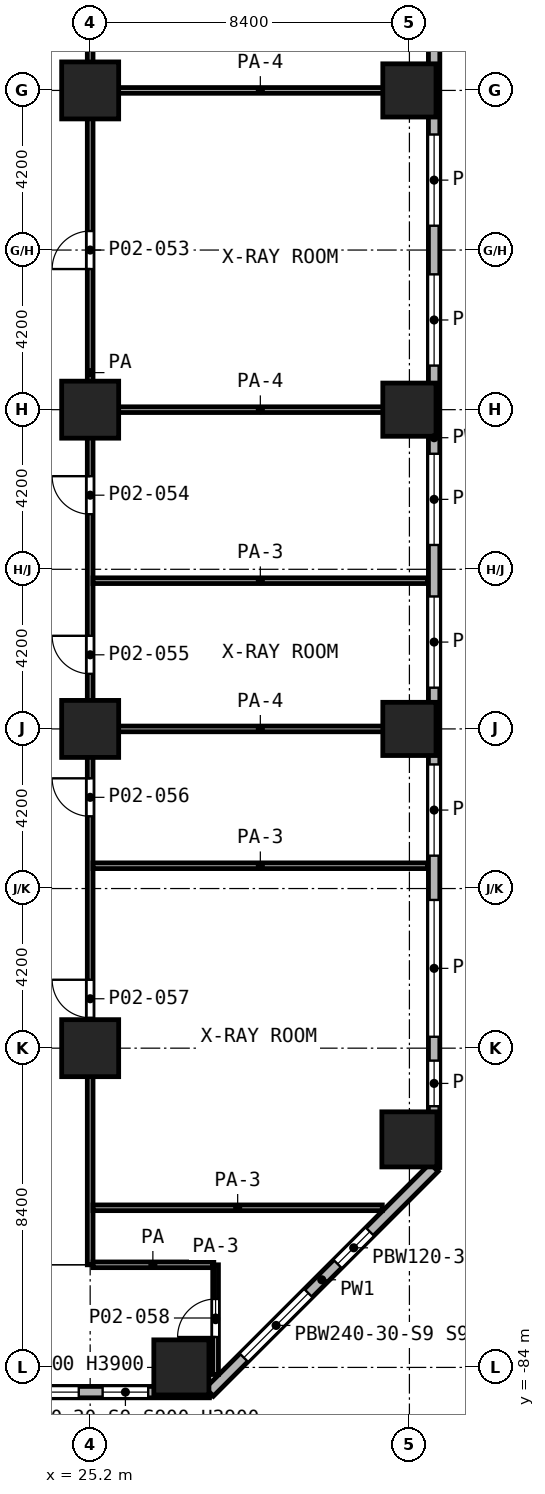
"""IFC4 building model, lengths in metres.
Left out: names, types, materials, properties, quantities, classifications, styles, units other than length and angle.
Written with IfcOpenShell. Run it as: python <this file> out.ifc"""

import sys

from ifc_helpers import new_model, si_unit, direction, frame, frame_2d, origin, origin_2d, place, context, subcontext, project, spatial, rectangle, extrude, element, fill, save


model = new_model("IFC4")
c1 = context("Model", 3, precision=1e-05, world=origin(), true_north=direction((0.0, 1.0)))
c2 = subcontext(c1, "Body", "Model", "MODEL_VIEW")
j1 = project(units=[si_unit("LENGTHUNIT", "METRE"), si_unit("PLANEANGLEUNIT", "RADIAN")], contexts=[c1])
p1 = place(None, origin())
s1 = spatial("IfcSite", under=j1, at=p1, CompositionType="ELEMENT")
p2 = place(p1, origin())
s2 = spatial("IfcBuilding", under=s1, at=p2, CompositionType="ELEMENT")
p3 = place(p2, frame((0.0, 0.0, 7.0)))
s3 = spatial("IfcBuildingStorey", under=s2, at=p3, CompositionType="ELEMENT", Elevation=7.0)
p4 = place(p3, frame((25.2, -50.4, 0.0), z_axis=(0.0, 0.0, 1.0), x_axis=(1.0, 0.0, 0.0)))
e1 = element("IfcColumn", 1, at=p4, inside=s3, PredefinedType="COLUMN", context=c2, shape_type="SweptSolid", body=[
    extrude(rectangle(XDim=1.5, YDim=1.5, at=origin_2d()), origin(), (0.0, 0.0, 1.0), 5.6),
])
p5 = place(p3, frame((33.6, -50.4, 0.0), z_axis=(0.0, 0.0, 1.0), x_axis=(1.0, 0.0, 0.0)))
e2 = element("IfcColumn", 2, at=p5, inside=s3, PredefinedType="COLUMN", context=c2, shape_type="SweptSolid", body=[
    extrude(rectangle(XDim=1.4, YDim=1.4, at=origin_2d()), origin(), (0.0, 0.0, 1.0), 5.6),
])
p6 = place(p3, frame((25.2, -58.8, 0.0), z_axis=(0.0, 0.0, 1.0), x_axis=(1.0, 0.0, 0.0)))
e3 = element("IfcColumn", 3, at=p6, inside=s3, PredefinedType="COLUMN", context=c2, shape_type="SweptSolid", body=[
    extrude(rectangle(XDim=1.5, YDim=1.5, at=origin_2d()), origin(), (0.0, 0.0, 1.0), 5.6),
])
p7 = place(p3, frame((33.6, -58.8, 0.0), z_axis=(0.0, 0.0, 1.0), x_axis=(1.0, 0.0, 0.0)))
e4 = element("IfcColumn", 4, at=p7, inside=s3, PredefinedType="COLUMN", context=c2, shape_type="SweptSolid", body=[
    extrude(rectangle(XDim=1.4, YDim=1.4, at=origin_2d()), origin(), (0.0, 0.0, 1.0), 5.6),
])
p8 = place(p3, frame((25.2, -67.2, 0.0), z_axis=(0.0, 0.0, 1.0), x_axis=(1.0, 0.0, 0.0)))
e5 = element("IfcColumn", 5, at=p8, inside=s3, PredefinedType="COLUMN", context=c2, shape_type="SweptSolid", body=[
    extrude(rectangle(XDim=1.5, YDim=1.5, at=origin_2d()), origin(), (0.0, 0.0, 1.0), 5.6),
])
p9 = place(p3, frame((33.6, -67.2, 0.0), z_axis=(0.0, 0.0, 1.0), x_axis=(1.0, 0.0, 0.0)))
e6 = element("IfcColumn", 6, at=p9, inside=s3, PredefinedType="COLUMN", context=c2, shape_type="SweptSolid", body=[
    extrude(rectangle(XDim=1.4, YDim=1.4, at=origin_2d()), origin(), (0.0, 0.0, 1.0), 5.6),
])
p10 = place(p3, frame((25.2, -75.6, 0.0), z_axis=(0.0, 0.0, 1.0), x_axis=(1.0, 0.0, 0.0)))
e7 = element("IfcColumn", 7, at=p10, inside=s3, PredefinedType="COLUMN", context=c2, shape_type="SweptSolid", body=[
    extrude(rectangle(XDim=1.5, YDim=1.5, at=origin_2d()), origin(), (0.0, 0.0, 1.0), 5.6),
])
for number, where, z_axis, x_axis in (
    (8, (33.6, -78.0, 0.0), (0.0, 0.0, 1.0), (1.0, 0.0, 0.0)),
    (9, (27.6, -84.0, 0.0), (0.0, 0.0, 1.0), (1.0, 0.0, 0.0)),
):
    element("IfcColumn", number, at=place(p3, frame(where, z_axis=z_axis, x_axis=x_axis)), inside=s3, PredefinedType="COLUMN", context=c2, shape_type="SweptSolid", body=[
        extrude(rectangle(XDim=1.45, YDim=1.45, at=origin_2d()), origin(), (0.0, 0.0, 1.0), 5.6),
    ])
p11 = place(p3, frame((34.25, -78.738, 0.0), z_axis=(0.0, 0.0, 1.0), x_axis=(0.0, 1.0, 0.0)))
e10 = element("IfcWall", 10, at=p11, inside=s3, PredefinedType="SOLIDWALL", context=c2, shape_type="SweptSolid", body=[
    extrude(rectangle(XDim=38.4, YDim=0.3, at=frame_2d((19.2, 0.0))), origin(), (0.0, 0.0, 1.0), 5.25),
])
p12 = place(p11, frame((1.61, 0.0, 0.9)))
e11 = element("IfcOpeningElement", 11, at=p12, cuts=e10, PredefinedType="OPENING", context=c2, shape_type="SweptSolid", body=[
    extrude(rectangle(XDim=1.2, YDim=3.0, at=frame_2d((0.6, 1.5))), frame((0.0, 0.16, 0.0), z_axis=(0.0, -1.0, 0.0), x_axis=(1.0, 0.0, 0.0)), (0.0, 0.0, 1.0), 0.32),
])
p13 = place(p11, frame((3.438, 0.0, 0.9)))
e12 = element("IfcOpeningElement", 12, at=p13, cuts=e10, PredefinedType="OPENING", context=c2, shape_type="SweptSolid", body=[
    extrude(rectangle(XDim=3.6, YDim=3.0, at=frame_2d((1.8, 1.5))), frame((0.0, 0.16, 0.0), z_axis=(0.0, -1.0, 0.0), x_axis=(1.0, 0.0, 0.0)), (0.0, 0.0, 1.0), 0.32),
])
p14 = place(p11, frame((8.203, 0.0, 0.9)))
e13 = element("IfcOpeningElement", 13, at=p14, cuts=e10, PredefinedType="OPENING", context=c2, shape_type="SweptSolid", body=[
    extrude(rectangle(XDim=2.4, YDim=3.0, at=frame_2d((1.2, 1.5))), frame((0.0, 0.16, 0.0), z_axis=(0.0, -1.0, 0.0), x_axis=(1.0, 0.0, 0.0)), (0.0, 0.0, 1.0), 0.32),
])
p15 = place(p11, frame((12.623, 0.0, 0.9)))
e14 = element("IfcOpeningElement", 14, at=p15, cuts=e10, PredefinedType="OPENING", context=c2, shape_type="SweptSolid", body=[
    extrude(rectangle(XDim=2.4, YDim=3.0, at=frame_2d((1.2, 1.5))), frame((0.0, 0.16, 0.0), z_axis=(0.0, -1.0, 0.0), x_axis=(1.0, 0.0, 0.0)), (0.0, 0.0, 1.0), 0.32),
])
p16 = place(p11, frame((16.378, 0.0, 0.9)))
e15 = element("IfcOpeningElement", 15, at=p16, cuts=e10, PredefinedType="OPENING", context=c2, shape_type="SweptSolid", body=[
    extrude(rectangle(XDim=2.4, YDim=3.0, at=frame_2d((1.2, 1.5))), frame((0.0, 0.16, 0.0), z_axis=(0.0, -1.0, 0.0), x_axis=(1.0, 0.0, 0.0)), (0.0, 0.0, 1.0), 0.32),
])
p17 = place(p11, frame((21.098, 0.0, 0.9)))
e16 = element("IfcOpeningElement", 16, at=p17, cuts=e10, PredefinedType="OPENING", context=c2, shape_type="SweptSolid", body=[
    extrude(rectangle(XDim=2.4, YDim=3.0, at=frame_2d((1.2, 1.5))), frame((0.0, 0.16, 0.0), z_axis=(0.0, -1.0, 0.0), x_axis=(1.0, 0.0, 0.0)), (0.0, 0.0, 1.0), 0.32),
])
p18 = place(p11, frame((24.778, 0.0, 0.9)))
e17 = element("IfcOpeningElement", 17, at=p18, cuts=e10, PredefinedType="OPENING", context=c2, shape_type="SweptSolid", body=[
    extrude(rectangle(XDim=2.4, YDim=3.0, at=frame_2d((1.2, 1.5))), frame((0.0, 0.16, 0.0), z_axis=(0.0, -1.0, 0.0), x_axis=(1.0, 0.0, 0.0)), (0.0, 0.0, 1.0), 0.32),
])
p19 = place(p11, frame((29.498, 0.0, 0.9)))
e18 = element("IfcOpeningElement", 18, at=p19, cuts=e10, PredefinedType="OPENING", context=c2, shape_type="SweptSolid", body=[
    extrude(rectangle(XDim=2.4, YDim=3.0, at=frame_2d((1.2, 1.5))), frame((0.0, 0.16, 0.0), z_axis=(0.0, -1.0, 0.0), x_axis=(1.0, 0.0, 0.0)), (0.0, 0.0, 1.0), 0.32),
])
p20 = place(p11, frame((32.838, 0.0, 0.9)))
e19 = element("IfcOpeningElement", 19, at=p20, cuts=e10, PredefinedType="OPENING", context=c2, shape_type="SweptSolid", body=[
    extrude(rectangle(XDim=3.6, YDim=3.0, at=frame_2d((1.8, 1.5))), frame((0.0, 0.16, 0.0), z_axis=(0.0, -1.0, 0.0), x_axis=(1.0, 0.0, 0.0)), (0.0, 0.0, 1.0), 0.32),
])
p21 = place(p3, frame((5.262, -84.65, 0.0), z_axis=(0.0, 0.0, 1.0), x_axis=(1.0, 0.0, 0.0)))
e20 = element("IfcWall", 20, at=p21, inside=s3, PredefinedType="SOLIDWALL", context=c2, shape_type="SweptSolid", body=[
    extrude(rectangle(XDim=23.076, YDim=0.3, at=frame_2d((11.538, 0.0))), origin(), (0.0, 0.0, 1.0), 5.25),
])
p22 = place(p21, frame((1.61, 0.0, 0.9)))
e21 = element("IfcOpeningElement", 21, at=p22, cuts=e20, PredefinedType="OPENING", context=c2, shape_type="SweptSolid", body=[
    extrude(rectangle(XDim=1.2, YDim=3.0, at=frame_2d((0.6, 1.5))), frame((0.0, 0.16, 0.0), z_axis=(0.0, -1.0, 0.0), x_axis=(1.0, 0.0, 0.0)), (0.0, 0.0, 1.0), 0.32),
])
p23 = place(p21, frame((3.963, 0.0, 0.9)))
e22 = element("IfcOpeningElement", 22, at=p23, cuts=e20, PredefinedType="OPENING", context=c2, shape_type="SweptSolid", body=[
    extrude(rectangle(XDim=1.2, YDim=3.0, at=frame_2d((0.6, 1.5))), frame((0.0, 0.16, 0.0), z_axis=(0.0, -1.0, 0.0), x_axis=(1.0, 0.0, 0.0)), (0.0, 0.0, 1.0), 0.32),
])
p24 = place(p21, frame((7.978, 0.0, 0.9)))
e23 = element("IfcOpeningElement", 23, at=p24, cuts=e20, PredefinedType="OPENING", context=c2, shape_type="SweptSolid", body=[
    extrude(rectangle(XDim=2.4, YDim=3.0, at=frame_2d((1.2, 1.5))), frame((0.0, 0.16, 0.0), z_axis=(0.0, -1.0, 0.0), x_axis=(1.0, 0.0, 0.0)), (0.0, 0.0, 1.0), 0.32),
])
p25 = place(p21, frame((12.698, 0.0, 0.9)))
e24 = element("IfcOpeningElement", 24, at=p25, cuts=e20, PredefinedType="OPENING", context=c2, shape_type="SweptSolid", body=[
    extrude(rectangle(XDim=2.4, YDim=3.0, at=frame_2d((1.2, 1.5))), frame((0.0, 0.16, 0.0), z_axis=(0.0, -1.0, 0.0), x_axis=(1.0, 0.0, 0.0)), (0.0, 0.0, 1.0), 0.32),
])
p26 = place(p21, frame((16.038, 0.0, 0.9)))
e25 = element("IfcOpeningElement", 25, at=p26, cuts=e20, PredefinedType="OPENING", context=c2, shape_type="SweptSolid", body=[
    extrude(rectangle(XDim=3.6, YDim=3.0, at=frame_2d((1.8, 1.5))), frame((0.0, 0.16, 0.0), z_axis=(0.0, -1.0, 0.0), x_axis=(1.0, 0.0, 0.0)), (0.0, 0.0, 1.0), 0.32),
])
p27 = place(p21, frame((20.265, 0.0, 0.9)))
e26 = element("IfcOpeningElement", 26, at=p27, cuts=e20, PredefinedType="OPENING", context=c2, shape_type="SweptSolid", body=[
    extrude(rectangle(XDim=1.2, YDim=3.0, at=frame_2d((0.6, 1.5))), frame((0.0, 0.16, 0.0), z_axis=(0.0, -1.0, 0.0), x_axis=(1.0, 0.0, 0.0)), (0.0, 0.0, 1.0), 0.32),
])
p28 = place(p3, frame((28.338, -84.65, 0.0), z_axis=(0.0, 0.0, 1.0), x_axis=(0.707106781187, 0.707106781187, 0.0)))
e27 = element("IfcWall", 27, at=p28, inside=s3, PredefinedType="SOLIDWALL", context=c2, shape_type="SweptSolid", body=[
    extrude(rectangle(XDim=8.361, YDim=0.3, at=frame_2d((4.181, 0.0))), origin(), (0.0, 0.0, 1.0), 5.25),
])
p29 = place(p28, frame((1.282, 0.0, 0.9)))
e28 = element("IfcOpeningElement", 28, at=p29, cuts=e27, PredefinedType="OPENING", context=c2, shape_type="SweptSolid", body=[
    extrude(rectangle(XDim=2.4, YDim=3.0, at=frame_2d((1.2, 1.5))), frame((0.0, 0.16, 0.0), z_axis=(0.0, -1.0, 0.0), x_axis=(1.0, 0.0, 0.0)), (0.0, 0.0, 1.0), 0.32),
])
p30 = place(p28, frame((4.77, 0.0, 0.9)))
e29 = element("IfcOpeningElement", 29, at=p30, cuts=e27, PredefinedType="OPENING", context=c2, shape_type="SweptSolid", body=[
    extrude(rectangle(XDim=1.2, YDim=3.0, at=frame_2d((0.6, 1.5))), frame((0.0, 0.16, 0.0), z_axis=(0.0, -1.0, 0.0), x_axis=(1.0, 0.0, 0.0)), (0.0, 0.0, 1.0), 0.32),
])
p31 = place(p3, frame((25.275, -81.3, 0.0), z_axis=(0.0, 0.0, 1.0), x_axis=(1.0, 0.0, 0.0)))
e30 = element("IfcWall", 30, at=p31, inside=s3, PredefinedType="PARTITIONING", context=c2, shape_type="SweptSolid", body=[
    extrude(rectangle(XDim=3.15, YDim=0.15, at=frame_2d((1.575, 0.0))), origin(), (0.0, 0.0, 1.0), 5.25),
])
p32 = place(p3, frame((25.275, -79.8, 0.0), z_axis=(0.0, 0.0, 1.0), x_axis=(1.0, 0.0, 0.0)))
e31 = element("IfcWall", 31, at=p32, inside=s3, PredefinedType="PARTITIONING", context=c2, shape_type="SweptSolid", body=[
    extrude(rectangle(XDim=7.612, YDim=0.15, at=frame_2d((3.806, 0.0))), origin(), (0.0, 0.0, 1.0), 3.85),
])
p33 = place(p3, frame((25.275, -70.8, 0.0), z_axis=(0.0, 0.0, 1.0), x_axis=(1.0, 0.0, 0.0)))
e32 = element("IfcWall", 32, at=p33, inside=s3, PredefinedType="PARTITIONING", context=c2, shape_type="SweptSolid", body=[
    extrude(rectangle(XDim=8.805, YDim=0.15, at=frame_2d((4.403, 0.0))), origin(), (0.0, 0.0, 1.0), 3.85),
])
p34 = place(p3, frame((25.275, -67.2, 0.0), z_axis=(0.0, 0.0, 1.0), x_axis=(1.0, 0.0, 0.0)))
e33 = element("IfcWall", 33, at=p34, inside=s3, PredefinedType="PARTITIONING", context=c2, shape_type="SweptSolid", body=[
    extrude(rectangle(XDim=8.805, YDim=0.15, at=frame_2d((4.403, 0.0))), origin(), (0.0, 0.0, 1.0), 4.35),
])
p35 = place(p3, frame((25.275, -63.3, 0.0), z_axis=(0.0, 0.0, 1.0), x_axis=(1.0, 0.0, 0.0)))
e34 = element("IfcWall", 34, at=p35, inside=s3, PredefinedType="PARTITIONING", context=c2, shape_type="SweptSolid", body=[
    extrude(rectangle(XDim=8.805, YDim=0.15, at=frame_2d((4.403, 0.0))), origin(), (0.0, 0.0, 1.0), 3.85),
])
for number, where, z_axis, x_axis in (
    (35, (25.275, -58.8, 0.0), (0.0, 0.0, 1.0), (1.0, 0.0, 0.0)),
    (36, (25.275, -50.4, 0.0), (0.0, 0.0, 1.0), (1.0, 0.0, 0.0)),
):
    element("IfcWall", number, at=place(p3, frame(where, z_axis=z_axis, x_axis=x_axis)), inside=s3, PredefinedType="PARTITIONING", context=c2, shape_type="SweptSolid", body=[
        extrude(rectangle(XDim=8.805, YDim=0.15, at=frame_2d((4.403, 0.0))), origin(), (0.0, 0.0, 1.0), 4.35),
    ])
p36 = place(p3, frame((25.2, -81.3, 0.0), z_axis=(0.0, 0.0, 1.0), x_axis=(0.0, 1.0, 0.0)))
e37 = element("IfcWall", 37, at=p36, inside=s3, PredefinedType="PARTITIONING", context=c2, shape_type="SweptSolid", body=[
    extrude(rectangle(XDim=46.95, YDim=0.15, at=frame_2d((23.475, 0.0))), origin(), (0.0, 0.0, 1.0), 5.25),
])
p37 = place(p36, frame((35.55, 0.0, 0.0)))
e38 = element("IfcOpeningElement", 38, at=p37, cuts=e37, PredefinedType="OPENING", context=c2, shape_type="SweptSolid", body=[
    extrude(rectangle(XDim=1.5, YDim=2.1, at=frame_2d((0.75, 1.05))), frame((0.0, 0.085, 0.0), z_axis=(0.0, -1.0, 0.0), x_axis=(1.0, 0.0, 0.0)), (0.0, 0.0, 1.0), 0.17),
])
p38 = place(p36, frame((26.2, 0.0, 0.0)))
e39 = element("IfcOpeningElement", 39, at=p38, cuts=e37, PredefinedType="OPENING", context=c2, shape_type="SweptSolid", body=[
    extrude(rectangle(XDim=1.0, YDim=2.1, at=frame_2d((0.5, 1.05))), frame((0.0, 0.085, 0.0), z_axis=(0.0, -1.0, 0.0), x_axis=(1.0, 0.0, 0.0)), (0.0, 0.0, 1.0), 0.17),
])
p39 = place(p36, frame((19.75, 0.0, 0.0)))
e40 = element("IfcOpeningElement", 40, at=p39, cuts=e37, PredefinedType="OPENING", context=c2, shape_type="SweptSolid", body=[
    extrude(rectangle(XDim=1.0, YDim=2.1, at=frame_2d((0.5, 1.05))), frame((0.0, 0.085, 0.0), z_axis=(0.0, -1.0, 0.0), x_axis=(1.0, 0.0, 0.0)), (0.0, 0.0, 1.0), 0.17),
])
p40 = place(p36, frame((15.55, 0.0, 0.0)))
e41 = element("IfcOpeningElement", 41, at=p40, cuts=e37, PredefinedType="OPENING", context=c2, shape_type="SweptSolid", body=[
    extrude(rectangle(XDim=1.0, YDim=2.1, at=frame_2d((0.5, 1.05))), frame((0.0, 0.085, 0.0), z_axis=(0.0, -1.0, 0.0), x_axis=(1.0, 0.0, 0.0)), (0.0, 0.0, 1.0), 0.17),
])
p41 = place(p36, frame((11.8, 0.0, 0.0)))
e42 = element("IfcOpeningElement", 42, at=p41, cuts=e37, PredefinedType="OPENING", context=c2, shape_type="SweptSolid", body=[
    extrude(rectangle(XDim=1.0, YDim=2.1, at=frame_2d((0.5, 1.05))), frame((0.0, 0.085, 0.0), z_axis=(0.0, -1.0, 0.0), x_axis=(1.0, 0.0, 0.0)), (0.0, 0.0, 1.0), 0.17),
])
p42 = place(p36, frame((6.5, 0.0, 0.0)))
e43 = element("IfcOpeningElement", 43, at=p42, cuts=e37, PredefinedType="OPENING", context=c2, shape_type="SweptSolid", body=[
    extrude(rectangle(XDim=1.0, YDim=2.1, at=frame_2d((0.5, 1.05))), frame((0.0, 0.085, 0.0), z_axis=(0.0, -1.0, 0.0), x_axis=(1.0, 0.0, 0.0)), (0.0, 0.0, 1.0), 0.17),
])
p43 = place(p3, frame((28.5, -84.187, 0.0), z_axis=(0.0, 0.0, 1.0), x_axis=(0.0, 1.0, 0.0)))
e44 = element("IfcWall", 44, at=p43, inside=s3, PredefinedType="PARTITIONING", context=c2, shape_type="SweptSolid", body=[
    extrude(rectangle(XDim=2.887, YDim=0.15, at=frame_2d((1.443, 0.0))), origin(), (0.0, 0.0, 1.0), 3.85),
])
p44 = place(p43, frame((0.987, 0.0, 0.0)))
e45 = element("IfcOpeningElement", 45, at=p44, cuts=e44, PredefinedType="OPENING", context=c2, shape_type="SweptSolid", body=[
    extrude(rectangle(XDim=1.0, YDim=2.1, at=frame_2d((0.5, 1.05))), frame((0.0, 0.085, 0.0), z_axis=(0.0, -1.0, 0.0), x_axis=(1.0, 0.0, 0.0)), (0.0, 0.0, 1.0), 0.17),
])
p45 = place(p12, origin())
e46 = element("IfcWindow", 46, at=p45, inside=s3, PartitioningType="SINGLE_PANEL", PredefinedType="WINDOW", context=c2, shape_type="SweptSolid", body=[
    extrude(rectangle(XDim=1.2, YDim=3.0, at=frame_2d((0.6, 1.5))), frame((0.0, 0.03, 0.0), z_axis=(0.0, -1.0, 0.0), x_axis=(1.0, 0.0, 0.0)), (0.0, 0.0, 1.0), 0.06),
])
fill(e11, e46)
p46 = place(p13, origin())
e47 = element("IfcWindow", 47, at=p46, inside=s3, PartitioningType="SINGLE_PANEL", PredefinedType="WINDOW", context=c2, shape_type="SweptSolid", body=[
    extrude(rectangle(XDim=3.6, YDim=3.0, at=frame_2d((1.8, 1.5))), frame((0.0, 0.03, 0.0), z_axis=(0.0, -1.0, 0.0), x_axis=(1.0, 0.0, 0.0)), (0.0, 0.0, 1.0), 0.06),
])
fill(e12, e47)
p47 = place(p14, origin())
e48 = element("IfcWindow", 48, at=p47, inside=s3, PartitioningType="SINGLE_PANEL", PredefinedType="WINDOW", context=c2, shape_type="SweptSolid", body=[
    extrude(rectangle(XDim=2.4, YDim=3.0, at=frame_2d((1.2, 1.5))), frame((0.0, 0.03, 0.0), z_axis=(0.0, -1.0, 0.0), x_axis=(1.0, 0.0, 0.0)), (0.0, 0.0, 1.0), 0.06),
])
fill(e13, e48)
p48 = place(p15, origin())
e49 = element("IfcWindow", 49, at=p48, inside=s3, PartitioningType="SINGLE_PANEL", PredefinedType="WINDOW", context=c2, shape_type="SweptSolid", body=[
    extrude(rectangle(XDim=2.4, YDim=3.0, at=frame_2d((1.2, 1.5))), frame((0.0, 0.03, 0.0), z_axis=(0.0, -1.0, 0.0), x_axis=(1.0, 0.0, 0.0)), (0.0, 0.0, 1.0), 0.06),
])
fill(e14, e49)
p49 = place(p16, origin())
e50 = element("IfcWindow", 50, at=p49, inside=s3, PartitioningType="SINGLE_PANEL", PredefinedType="WINDOW", context=c2, shape_type="SweptSolid", body=[
    extrude(rectangle(XDim=2.4, YDim=3.0, at=frame_2d((1.2, 1.5))), frame((0.0, 0.03, 0.0), z_axis=(0.0, -1.0, 0.0), x_axis=(1.0, 0.0, 0.0)), (0.0, 0.0, 1.0), 0.06),
])
fill(e15, e50)
p50 = place(p17, origin())
e51 = element("IfcWindow", 51, at=p50, inside=s3, PartitioningType="SINGLE_PANEL", PredefinedType="WINDOW", context=c2, shape_type="SweptSolid", body=[
    extrude(rectangle(XDim=2.4, YDim=3.0, at=frame_2d((1.2, 1.5))), frame((0.0, 0.03, 0.0), z_axis=(0.0, -1.0, 0.0), x_axis=(1.0, 0.0, 0.0)), (0.0, 0.0, 1.0), 0.06),
])
fill(e16, e51)
p51 = place(p18, origin())
e52 = element("IfcWindow", 52, at=p51, inside=s3, PartitioningType="SINGLE_PANEL", PredefinedType="WINDOW", context=c2, shape_type="SweptSolid", body=[
    extrude(rectangle(XDim=2.4, YDim=3.0, at=frame_2d((1.2, 1.5))), frame((0.0, 0.03, 0.0), z_axis=(0.0, -1.0, 0.0), x_axis=(1.0, 0.0, 0.0)), (0.0, 0.0, 1.0), 0.06),
])
fill(e17, e52)
p52 = place(p26, origin())
e53 = element("IfcWindow", 53, at=p52, inside=s3, PartitioningType="SINGLE_PANEL", PredefinedType="WINDOW", context=c2, shape_type="SweptSolid", body=[
    extrude(rectangle(XDim=3.6, YDim=3.0, at=frame_2d((1.8, 1.5))), frame((0.0, 0.03, 0.0), z_axis=(0.0, -1.0, 0.0), x_axis=(1.0, 0.0, 0.0)), (0.0, 0.0, 1.0), 0.06),
])
fill(e25, e53)
p53 = place(p27, origin())
e54 = element("IfcWindow", 54, at=p53, inside=s3, PartitioningType="SINGLE_PANEL", PredefinedType="WINDOW", context=c2, shape_type="SweptSolid", body=[
    extrude(rectangle(XDim=1.2, YDim=3.0, at=frame_2d((0.6, 1.5))), frame((0.0, 0.03, 0.0), z_axis=(0.0, -1.0, 0.0), x_axis=(1.0, 0.0, 0.0)), (0.0, 0.0, 1.0), 0.06),
])
fill(e26, e54)
p54 = place(p29, origin())
e55 = element("IfcWindow", 55, at=p54, inside=s3, PartitioningType="SINGLE_PANEL", PredefinedType="WINDOW", context=c2, shape_type="SweptSolid", body=[
    extrude(rectangle(XDim=2.4, YDim=3.0, at=frame_2d((1.2, 1.5))), frame((0.0, 0.03, 0.0), z_axis=(0.0, -1.0, 0.0), x_axis=(1.0, 0.0, 0.0)), (0.0, 0.0, 1.0), 0.06),
])
fill(e28, e55)
p55 = place(p30, origin())
e56 = element("IfcWindow", 56, at=p55, inside=s3, PartitioningType="SINGLE_PANEL", PredefinedType="WINDOW", context=c2, shape_type="SweptSolid", body=[
    extrude(rectangle(XDim=1.2, YDim=3.0, at=frame_2d((0.6, 1.5))), frame((0.0, 0.03, 0.0), z_axis=(0.0, -1.0, 0.0), x_axis=(1.0, 0.0, 0.0)), (0.0, 0.0, 1.0), 0.06),
])
fill(e29, e56)
p56 = place(p38, origin())
e57 = element("IfcDoor", 57, at=p56, inside=s3, OperationType="SINGLE_SWING_LEFT", PredefinedType="DOOR", context=c2, shape_type="SweptSolid", body=[
    extrude(rectangle(XDim=1.0, YDim=2.1, at=frame_2d((0.5, 1.05))), frame((0.0, 0.025, 0.0), z_axis=(0.0, -1.0, 0.0), x_axis=(1.0, 0.0, 0.0)), (0.0, 0.0, 1.0), 0.05),
])
fill(e39, e57)
p57 = place(p39, origin())
e58 = element("IfcDoor", 58, at=p57, inside=s3, OperationType="SINGLE_SWING_RIGHT", PredefinedType="DOOR", context=c2, shape_type="SweptSolid", body=[
    extrude(rectangle(XDim=1.0, YDim=2.1, at=frame_2d((0.5, 1.05))), frame((0.0, 0.025, 0.0), z_axis=(0.0, -1.0, 0.0), x_axis=(1.0, 0.0, 0.0)), (0.0, 0.0, 1.0), 0.05),
])
fill(e40, e58)
p58 = place(p40, origin())
e59 = element("IfcDoor", 59, at=p58, inside=s3, OperationType="SINGLE_SWING_RIGHT", PredefinedType="DOOR", context=c2, shape_type="SweptSolid", body=[
    extrude(rectangle(XDim=1.0, YDim=2.1, at=frame_2d((0.5, 1.05))), frame((0.0, 0.025, 0.0), z_axis=(0.0, -1.0, 0.0), x_axis=(1.0, 0.0, 0.0)), (0.0, 0.0, 1.0), 0.05),
])
fill(e41, e59)
p59 = place(p41, origin())
e60 = element("IfcDoor", 60, at=p59, inside=s3, OperationType="SINGLE_SWING_RIGHT", PredefinedType="DOOR", context=c2, shape_type="SweptSolid", body=[
    extrude(rectangle(XDim=1.0, YDim=2.1, at=frame_2d((0.5, 1.05))), frame((0.0, 0.025, 0.0), z_axis=(0.0, -1.0, 0.0), x_axis=(1.0, 0.0, 0.0)), (0.0, 0.0, 1.0), 0.05),
])
fill(e42, e60)
p60 = place(p42, origin())
e61 = element("IfcDoor", 61, at=p60, inside=s3, OperationType="SINGLE_SWING_RIGHT", PredefinedType="DOOR", context=c2, shape_type="SweptSolid", body=[
    extrude(rectangle(XDim=1.0, YDim=2.1, at=frame_2d((0.5, 1.05))), frame((0.0, 0.025, 0.0), z_axis=(0.0, -1.0, 0.0), x_axis=(1.0, 0.0, 0.0)), (0.0, 0.0, 1.0), 0.05),
])
fill(e43, e61)
p61 = place(p44, origin())
e62 = element("IfcDoor", 62, at=p61, inside=s3, OperationType="SINGLE_SWING_LEFT", PredefinedType="DOOR", context=c2, shape_type="SweptSolid", body=[
    extrude(rectangle(XDim=1.0, YDim=2.1, at=frame_2d((0.5, 1.05))), frame((0.0, 0.025, 0.0), z_axis=(0.0, -1.0, 0.0), x_axis=(1.0, 0.0, 0.0)), (0.0, 0.0, 1.0), 0.05),
])
fill(e45, e62)
save(model, sys.argv[1])
